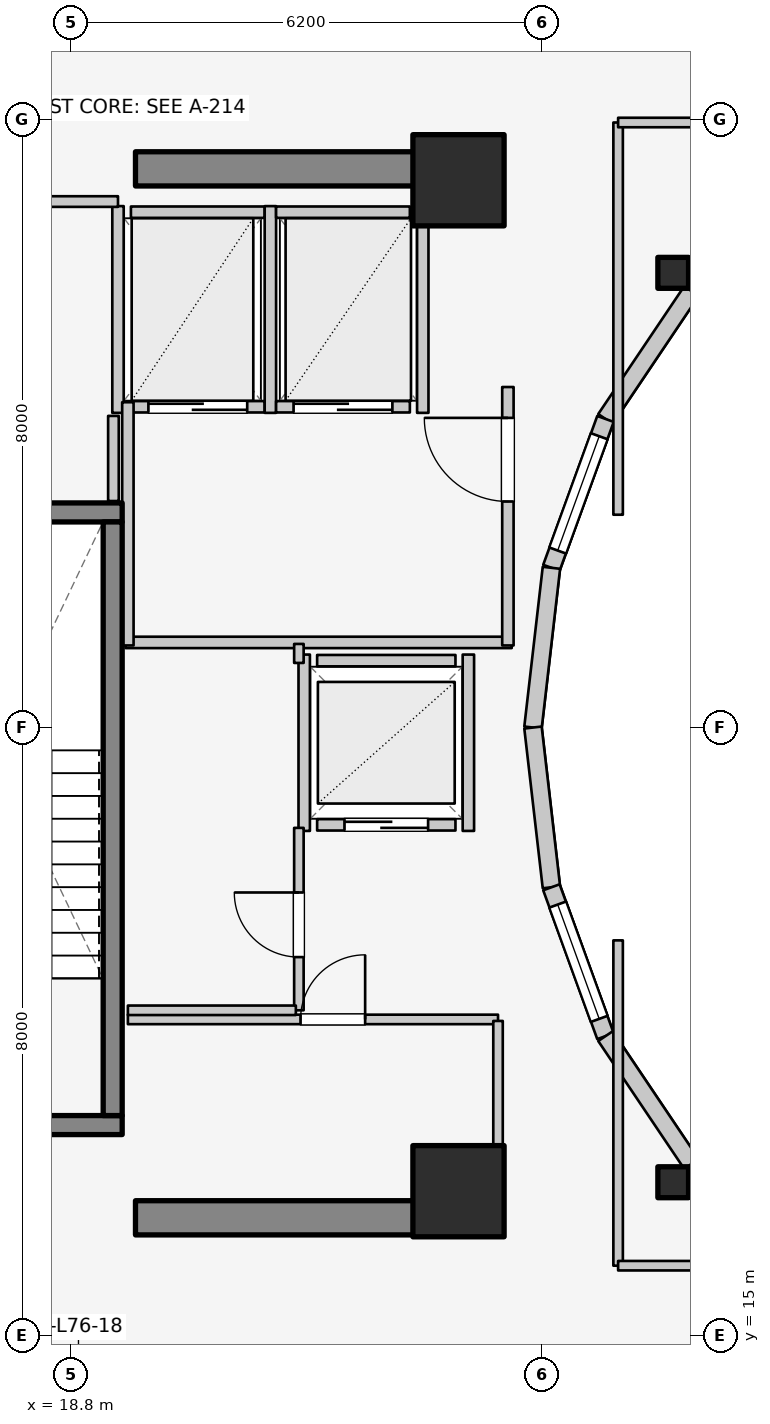
"""IFC4 building model, lengths in metres.
Left out: names, types, materials, properties, quantities, classifications, styles, units other than length and angle.
Written with IfcOpenShell. Run it as: python <this file> out.ifc"""

import sys

from ifc_helpers import new_model, si_unit, direction, frame, frame_2d, origin, origin_2d, place, context, subcontext, project, spatial, rectangle, i_section, extrude, element, fill, save


model = new_model("IFC4")
c1 = context("Model", 3, precision=1e-05, world=origin(), true_north=direction((0.0, 1.0)))
c2 = subcontext(c1, "Body", "Model", "MODEL_VIEW")
j1 = project(units=[si_unit("LENGTHUNIT", "METRE"), si_unit("PLANEANGLEUNIT", "RADIAN")], contexts=[c1])
p1 = place(None, origin())
s1 = spatial("IfcSite", under=j1, at=p1, CompositionType="ELEMENT")
p2 = place(p1, origin())
s2 = spatial("IfcBuilding", under=s1, at=p2, CompositionType="ELEMENT")
p3 = place(p2, frame((0.0, 0.0, 249.6)))
s3 = spatial("IfcBuildingStorey", under=s2, at=p3, CompositionType="ELEMENT", Elevation=249.6)
for number, where, z_axis, x_axis in (
    (1, (19.65, 16.55, 0.0), (0.0, 0.0, 1.0), (1.0, 0.0, 0.0)),
    (2, (19.65, 30.35, 0.0), (0.0, 0.0, 1.0), (1.0, 0.0, 0.0)),
):
    element("IfcWall", number, at=place(p3, frame(where, z_axis=z_axis, x_axis=x_axis)), inside=s3, PredefinedType="SHEAR", context=c2, shape_type="SweptSolid", body=[
        extrude(rectangle(XDim=4.5, YDim=0.45, at=frame_2d((2.25, 0.0))), origin(), (0.0, 0.0, 1.0), 3.6),
    ])
p4 = place(p3, frame((16.105, 17.77, 0.0), z_axis=(0.0, 0.0, 1.0), x_axis=(1.0, 0.0, 0.0)))
e3 = element("IfcWall", 3, at=p4, inside=s3, PredefinedType="SOLIDWALL", context=c2, shape_type="SweptSolid", body=[
    extrude(rectangle(XDim=3.37, YDim=0.25, at=frame_2d((1.685, 0.0))), origin(), (0.0, 0.0, 1.0), 3.6),
])
p5 = place(p4, frame((1.135, 0.0, 0.0)))
e4 = element("IfcOpeningElement", 4, at=p5, cuts=e3, PredefinedType="OPENING", context=c2, shape_type="SweptSolid", body=[
    extrude(rectangle(XDim=1.1, YDim=2.1, at=frame_2d((0.55, 1.05))), frame((0.0, 0.135, 0.0), z_axis=(0.0, -1.0, 0.0), x_axis=(1.0, 0.0, 0.0)), (0.0, 0.0, 1.0), 0.27),
])
p6 = place(p3, frame((16.105, 25.83, 0.0), z_axis=(0.0, 0.0, 1.0), x_axis=(1.0, 0.0, 0.0)))
e5 = element("IfcWall", 5, at=p6, inside=s3, PredefinedType="SOLIDWALL", context=c2, shape_type="SweptSolid", body=[
    extrude(rectangle(XDim=3.37, YDim=0.25, at=frame_2d((1.685, 0.0))), origin(), (0.0, 0.0, 1.0), 3.6),
])
p7 = place(p3, frame((19.35, 17.895, 0.0), z_axis=(0.0, 0.0, 1.0), x_axis=(0.0, 1.0, 0.0)))
e6 = element("IfcWall", 6, at=p7, inside=s3, PredefinedType="SOLIDWALL", context=c2, shape_type="SweptSolid", body=[
    extrude(rectangle(XDim=7.81, YDim=0.25, at=frame_2d((3.905, 0.0))), origin(), (0.0, 0.0, 1.0), 3.6),
])
for number, where, z_axis, x_axis in (
    (7, (23.9, 16.9, 0.0), (0.0, 0.0, 1.0), (1.0, 0.0, 0.0)),
    (8, (23.9, 30.2, 0.0), (0.0, 0.0, 1.0), (1.0, 0.0, 0.0)),
):
    element("IfcColumn", number, at=place(p3, frame(where, z_axis=z_axis, x_axis=x_axis)), inside=s3, PredefinedType="COLUMN", context=c2, shape_type="SweptSolid", body=[
        extrude(rectangle(XDim=1.2, YDim=1.2, at=origin_2d()), origin(), (0.0, 0.0, 1.0), 3.6),
    ])
for number, where, z_axis, x_axis in (
    (9, (26.725, 28.982, 0.0), (0.0, 0.0, 1.0), (1.0, 0.0, 0.0)),
    (10, (26.725, 17.018, 0.0), (0.0, 0.0, 1.0), (1.0, 0.0, 0.0)),
):
    element("IfcColumn", number, at=place(p3, frame(where, z_axis=z_axis, x_axis=x_axis)), inside=s3, PredefinedType="COLUMN", context=c2, shape_type="SweptSolid", body=[
        extrude(i_section(OverallWidth=0.404, OverallDepth=0.407, WebThickness=0.027, FlangeThickness=0.044, FilletRadius=0.025, at=origin_2d()), origin(), (0.0, 0.0, 1.0), 3.6),
    ])
p8 = place(p3, frame((28.44, 30.032, 0.0), z_axis=(0.0, 0.0, 1.0), x_axis=(-0.752576694707, -0.658504607869, 0.0)))
e11 = element("IfcWall", 11, at=p8, inside=s3, PredefinedType="STANDARD", context=c2, shape_type="SweptSolid", body=[
    extrude(rectangle(XDim=1.959, YDim=0.23, at=frame_2d((0.98, 0.0))), origin(), (0.0, 0.0, 1.0), 2.6),
])
p9 = place(p3, frame((26.965, 28.742, 0.0), z_axis=(0.0, 0.0, 1.0), x_axis=(-0.558197800898, -0.829707909492, 0.0)))
e12 = element("IfcWall", 12, at=p9, inside=s3, PredefinedType="STANDARD", context=c2, shape_type="SweptSolid", body=[
    extrude(rectangle(XDim=2.027, YDim=0.23, at=frame_2d((1.013, 0.0))), origin(), (0.0, 0.0, 1.0), 2.6),
])
p10 = place(p3, frame((25.834, 27.06, 0.0), z_axis=(0.0, 0.0, 1.0), x_axis=(-0.341423187295, -0.93990968033, 0.0)))
e13 = element("IfcWall", 13, at=p10, inside=s3, PredefinedType="STANDARD", context=c2, shape_type="SweptSolid", body=[
    extrude(rectangle(XDim=2.084, YDim=0.23, at=frame_2d((1.042, 0.0))), origin(), (0.0, 0.0, 1.0), 3.28),
])
p11 = place(p10, frame((0.242, 0.0, 0.85)))
e14 = element("IfcOpeningElement", 14, at=p11, cuts=e13, PredefinedType="OPENING", context=c2, shape_type="SweptSolid", body=[
    extrude(rectangle(XDim=1.6, YDim=1.65, at=frame_2d((0.8, 0.825))), frame((0.0, 0.125, 0.0), z_axis=(0.0, -1.0, 0.0), x_axis=(1.0, 0.0, 0.0)), (0.0, 0.0, 1.0), 0.25),
])
for number, where, z_axis, x_axis in (
    (15, (25.123, 25.102, 0.0), (0.0, 0.0, 1.0), (-0.115, -0.993, 0.0)),
    (16, (24.88, 23.0, 0.0), (0.0, 0.0, 1.0), (0.115, -0.993, 0.0)),
):
    element("IfcWall", number, at=place(p3, frame(where, z_axis=z_axis, x_axis=x_axis)), inside=s3, PredefinedType="STANDARD", context=c2, shape_type="SweptSolid", body=[
        extrude(rectangle(XDim=2.115, YDim=0.23, at=frame_2d((1.058, 0.0))), origin(), (0.0, 0.0, 1.0), 3.28),
    ])
p12 = place(p3, frame((25.123, 20.898, 0.0), z_axis=(0.0, 0.0, 1.0), x_axis=(0.341423187295, -0.93990968033, 0.0)))
e17 = element("IfcWall", 17, at=p12, inside=s3, PredefinedType="STANDARD", context=c2, shape_type="SweptSolid", body=[
    extrude(rectangle(XDim=2.084, YDim=0.23, at=frame_2d((1.042, 0.0))), origin(), (0.0, 0.0, 1.0), 3.28),
])
p13 = place(p12, frame((0.242, 0.0, 0.85)))
e18 = element("IfcOpeningElement", 18, at=p13, cuts=e17, PredefinedType="OPENING", context=c2, shape_type="SweptSolid", body=[
    extrude(rectangle(XDim=1.6, YDim=1.65, at=frame_2d((0.8, 0.825))), frame((0.0, 0.125, 0.0), z_axis=(0.0, -1.0, 0.0), x_axis=(1.0, 0.0, 0.0)), (0.0, 0.0, 1.0), 0.25),
])
p14 = place(p3, frame((25.834, 18.94, 0.0), z_axis=(0.0, 0.0, 1.0), x_axis=(0.558197800898, -0.829707909492, 0.0)))
e19 = element("IfcWall", 19, at=p14, inside=s3, PredefinedType="STANDARD", context=c2, shape_type="SweptSolid", body=[
    extrude(rectangle(XDim=2.027, YDim=0.23, at=frame_2d((1.013, 0.0))), origin(), (0.0, 0.0, 1.0), 2.6),
])
p15 = place(p3, frame((26.965, 17.258, 0.0), z_axis=(0.0, 0.0, 1.0), x_axis=(0.752576694707, -0.658504607869, 0.0)))
e20 = element("IfcWall", 20, at=p15, inside=s3, PredefinedType="STANDARD", context=c2, shape_type="SweptSolid", body=[
    extrude(rectangle(XDim=1.959, YDim=0.23, at=frame_2d((0.98, 0.0))), origin(), (0.0, 0.0, 1.0), 2.6),
])
p16 = place(p3, frame((22.04, 21.72, 0.0), z_axis=(0.0, 0.0, 1.0), x_axis=(1.0, 0.0, 0.0)))
e21 = element("IfcWall", 21, at=p16, inside=s3, PredefinedType="SOLIDWALL", context=c2, shape_type="SweptSolid", body=[
    extrude(rectangle(XDim=1.82, YDim=0.15, at=frame_2d((0.91, 0.0))), origin(), (0.0, 0.0, 1.0), 2.62),
])
p17 = place(p16, frame((0.36, 0.0, 0.0)))
e22 = element("IfcOpeningElement", 22, at=p17, cuts=e21, PredefinedType="OPENING", context=c2, shape_type="SweptSolid", body=[
    extrude(rectangle(XDim=1.1, YDim=2.1, at=frame_2d((0.55, 1.05))), frame((0.0, 0.085, 0.0), z_axis=(0.0, -1.0, 0.0), x_axis=(1.0, 0.0, 0.0)), (0.0, 0.0, 1.0), 0.17),
])
p18 = place(p3, frame((22.04, 23.88, 0.0), z_axis=(0.0, 0.0, 1.0), x_axis=(1.0, 0.0, 0.0)))
e23 = element("IfcWall", 23, at=p18, inside=s3, PredefinedType="SOLIDWALL", context=c2, shape_type="SweptSolid", body=[
    extrude(rectangle(XDim=1.82, YDim=0.15, at=frame_2d((0.91, 0.0))), origin(), (0.0, 0.0, 1.0), 2.62),
])
p19 = place(p3, frame((21.87, 21.64, 0.0), z_axis=(0.0, 0.0, 1.0), x_axis=(0.0, 1.0, 0.0)))
e24 = element("IfcWall", 24, at=p19, inside=s3, PredefinedType="SOLIDWALL", context=c2, shape_type="SweptSolid", body=[
    extrude(rectangle(XDim=2.32, YDim=0.15, at=frame_2d((1.16, 0.0))), origin(), (0.0, 0.0, 1.0), 3.295),
])
p20 = place(p3, frame((24.03, 21.64, 0.0), z_axis=(0.0, 0.0, 1.0), x_axis=(0.0, 1.0, 0.0)))
e25 = element("IfcWall", 25, at=p20, inside=s3, PredefinedType="SOLIDWALL", context=c2, shape_type="SweptSolid", body=[
    extrude(rectangle(XDim=2.32, YDim=0.15, at=frame_2d((1.16, 0.0))), origin(), (0.0, 0.0, 1.0), 2.62),
])
p21 = place(p3, frame((19.59, 27.22, 0.0), z_axis=(0.0, 0.0, 1.0), x_axis=(1.0, 0.0, 0.0)))
e26 = element("IfcWall", 26, at=p21, inside=s3, PredefinedType="SOLIDWALL", context=c2, shape_type="SweptSolid", body=[
    extrude(rectangle(XDim=1.76, YDim=0.15, at=frame_2d((0.88, 0.0))), origin(), (0.0, 0.0, 1.0), 3.295),
])
p22 = place(p21, frame((0.23, 0.0, 0.0)))
e27 = element("IfcOpeningElement", 27, at=p22, cuts=e26, PredefinedType="OPENING", context=c2, shape_type="SweptSolid", body=[
    extrude(rectangle(XDim=1.3, YDim=2.1, at=frame_2d((0.65, 1.05))), frame((0.0, 0.085, 0.0), z_axis=(0.0, -1.0, 0.0), x_axis=(1.0, 0.0, 0.0)), (0.0, 0.0, 1.0), 0.17),
])
p23 = place(p3, frame((19.59, 29.78, 0.0), z_axis=(0.0, 0.0, 1.0), x_axis=(1.0, 0.0, 0.0)))
e28 = element("IfcWall", 28, at=p23, inside=s3, PredefinedType="SOLIDWALL", context=c2, shape_type="SweptSolid", body=[
    extrude(rectangle(XDim=1.76, YDim=0.15, at=frame_2d((0.88, 0.0))), origin(), (0.0, 0.0, 1.0), 3.295),
])
for number, where, z_axis, x_axis in (
    (29, (19.42, 27.14, 0.0), (0.0, 0.0, 1.0), (0.0, 1.0, 0.0)),
    (30, (21.425, 27.14, 0.0), (0.0, 0.0, 1.0), (0.0, 1.0, 0.0)),
):
    element("IfcWall", number, at=place(p3, frame(where, z_axis=z_axis, x_axis=x_axis)), inside=s3, PredefinedType="SOLIDWALL", context=c2, shape_type="SweptSolid", body=[
        extrude(rectangle(XDim=2.72, YDim=0.15, at=frame_2d((1.36, 0.0))), origin(), (0.0, 0.0, 1.0), 3.295),
    ])
p24 = place(p3, frame((21.5, 27.22, 0.0), z_axis=(0.0, 0.0, 1.0), x_axis=(1.0, 0.0, 0.0)))
e31 = element("IfcWall", 31, at=p24, inside=s3, PredefinedType="SOLIDWALL", context=c2, shape_type="SweptSolid", body=[
    extrude(rectangle(XDim=1.76, YDim=0.15, at=frame_2d((0.88, 0.0))), origin(), (0.0, 0.0, 1.0), 3.295),
])
p25 = place(p24, frame((0.23, 0.0, 0.0)))
e32 = element("IfcOpeningElement", 32, at=p25, cuts=e31, PredefinedType="OPENING", context=c2, shape_type="SweptSolid", body=[
    extrude(rectangle(XDim=1.3, YDim=2.1, at=frame_2d((0.65, 1.05))), frame((0.0, 0.085, 0.0), z_axis=(0.0, -1.0, 0.0), x_axis=(1.0, 0.0, 0.0)), (0.0, 0.0, 1.0), 0.17),
])
p26 = place(p3, frame((21.5, 29.78, 0.0), z_axis=(0.0, 0.0, 1.0), x_axis=(1.0, 0.0, 0.0)))
e33 = element("IfcWall", 33, at=p26, inside=s3, PredefinedType="SOLIDWALL", context=c2, shape_type="SweptSolid", body=[
    extrude(rectangle(XDim=1.76, YDim=0.15, at=frame_2d((0.88, 0.0))), origin(), (0.0, 0.0, 1.0), 3.295),
])
p27 = place(p3, frame((23.43, 27.14, 0.0), z_axis=(0.0, 0.0, 1.0), x_axis=(0.0, 1.0, 0.0)))
e34 = element("IfcWall", 34, at=p27, inside=s3, PredefinedType="SOLIDWALL", context=c2, shape_type="SweptSolid", body=[
    extrude(rectangle(XDim=2.72, YDim=0.15, at=frame_2d((1.36, 0.0))), origin(), (0.0, 0.0, 1.0), 3.295),
])
p28 = place(p3, frame((19.52, 24.12, 0.0), z_axis=(0.0, 0.0, 1.0), x_axis=(1.0, 0.0, 0.0)))
e35 = element("IfcWall", 35, at=p28, inside=s3, PredefinedType="PARTITIONING", context=c2, shape_type="SweptSolid", body=[
    extrude(rectangle(XDim=5.08, YDim=0.15, at=frame_2d((2.54, 0.0))), origin(), (0.0, 0.0, 1.0), 2.62),
])
p29 = place(p3, frame((19.55, 24.08, 0.0), z_axis=(0.0, 0.0, 1.0), x_axis=(0.0, 1.0, 0.0)))
e36 = element("IfcWall", 36, at=p29, inside=s3, PredefinedType="PARTITIONING", context=c2, shape_type="SweptSolid", body=[
    extrude(rectangle(XDim=3.2, YDim=0.15, at=frame_2d((1.6, 0.0))), origin(), (0.0, 0.0, 1.0), 3.295),
])
p30 = place(p3, frame((24.55, 24.08, 0.0), z_axis=(0.0, 0.0, 1.0), x_axis=(0.0, 1.0, 0.0)))
e37 = element("IfcWall", 37, at=p30, inside=s3, PredefinedType="PARTITIONING", context=c2, shape_type="SweptSolid", body=[
    extrude(rectangle(XDim=3.4, YDim=0.15, at=frame_2d((1.7, 0.0))), origin(), (0.0, 0.0, 1.0), 3.295),
])
p31 = place(p30, frame((1.894, 0.0, 0.0)))
e38 = element("IfcOpeningElement", 38, at=p31, cuts=e37, PredefinedType="OPENING", context=c2, shape_type="SweptSolid", body=[
    extrude(rectangle(XDim=1.1, YDim=2.1, at=frame_2d((0.55, 1.05))), frame((0.0, 0.085, 0.0), z_axis=(0.0, -1.0, 0.0), x_axis=(1.0, 0.0, 0.0)), (0.0, 0.0, 1.0), 0.17),
])
p32 = place(p3, frame((19.55, 19.16, 0.0), z_axis=(0.0, 0.0, 1.0), x_axis=(1.0, 0.0, 0.0)))
e39 = element("IfcWall", 39, at=p32, inside=s3, PredefinedType="PARTITIONING", context=c2, shape_type="SweptSolid", body=[
    extrude(rectangle(XDim=4.87, YDim=0.125, at=frame_2d((2.435, 0.0))), origin(), (0.0, 0.0, 1.0), 2.62),
])
p33 = place(p32, frame((2.272, 0.0, 0.0)))
e40 = element("IfcOpeningElement", 40, at=p33, cuts=e39, PredefinedType="OPENING", context=c2, shape_type="SweptSolid", body=[
    extrude(rectangle(XDim=0.85, YDim=2.05, at=frame_2d((0.425, 1.025))), frame((0.0, 0.073, 0.0), z_axis=(0.0, -1.0, 0.0), x_axis=(1.0, 0.0, 0.0)), (0.0, 0.0, 1.0), 0.145),
])
p34 = place(p3, frame((24.42, 17.1, 0.0), z_axis=(0.0, 0.0, 1.0), x_axis=(0.0, 1.0, 0.0)))
e41 = element("IfcWall", 41, at=p34, inside=s3, PredefinedType="PARTITIONING", context=c2, shape_type="SweptSolid", body=[
    extrude(rectangle(XDim=2.04, YDim=0.125, at=frame_2d((1.02, 0.0))), origin(), (0.0, 0.0, 1.0), 2.672),
])
p35 = place(p3, frame((21.8, 19.28, 0.0), z_axis=(0.0, 0.0, 1.0), x_axis=(0.0, 1.0, 0.0)))
e42 = element("IfcWall", 42, at=p35, inside=s3, PredefinedType="PARTITIONING", context=c2, shape_type="SweptSolid", body=[
    extrude(rectangle(XDim=2.4, YDim=0.125, at=frame_2d((1.2, 0.0))), origin(), (0.0, 0.0, 1.0), 3.295),
])
p36 = place(p35, frame((0.7, 0.0, 0.0)))
e43 = element("IfcOpeningElement", 43, at=p36, cuts=e42, PredefinedType="OPENING", context=c2, shape_type="SweptSolid", body=[
    extrude(rectangle(XDim=0.85, YDim=2.05, at=frame_2d((0.425, 1.025))), frame((0.0, 0.073, 0.0), z_axis=(0.0, -1.0, 0.0), x_axis=(1.0, 0.0, 0.0)), (0.0, 0.0, 1.0), 0.145),
])
p37 = place(p3, frame((21.8, 23.85, 0.0), z_axis=(0.0, 0.0, 1.0), x_axis=(0.0, 1.0, 0.0)))
e44 = element("IfcWall", 44, at=p37, inside=s3, PredefinedType="PARTITIONING", context=c2, shape_type="SweptSolid", body=[
    extrude(rectangle(XDim=0.25, YDim=0.125, at=frame_2d((0.125, 0.0))), origin(), (0.0, 0.0, 1.0), 3.295),
])
p38 = place(p3, frame((19.55, 19.28, 0.0), z_axis=(0.0, 0.0, 1.0), x_axis=(1.0, 0.0, 0.0)))
e45 = element("IfcWall", 45, at=p38, inside=s3, PredefinedType="PARTITIONING", context=c2, shape_type="SweptSolid", body=[
    extrude(rectangle(XDim=2.21, YDim=0.125, at=frame_2d((1.105, 0.0))), origin(), (0.0, 0.0, 1.0), 2.62),
])
p39 = place(p3, frame((16.12, 29.92, 0.0), z_axis=(0.0, 0.0, 1.0), x_axis=(1.0, 0.0, 0.0)))
e46 = element("IfcWall", 46, at=p39, inside=s3, PredefinedType="PLUMBINGWALL", context=c2, shape_type="SweptSolid", body=[
    extrude(rectangle(XDim=3.3, YDim=0.14, at=frame_2d((1.65, 0.0))), origin(), (0.0, 0.0, 1.0), 3.295),
])
p40 = place(p39, frame((1.399, 0.0, 0.0)))
e47 = element("IfcOpeningElement", 47, at=p40, cuts=e46, PredefinedType="OPENING", context=c2, shape_type="SweptSolid", body=[
    extrude(rectangle(XDim=0.85, YDim=2.05, at=frame_2d((0.425, 1.025))), frame((0.0, 0.08, 0.0), z_axis=(0.0, -1.0, 0.0), x_axis=(1.0, 0.0, 0.0)), (0.0, 0.0, 1.0), 0.16),
])
p41 = place(p3, frame((19.36, 25.98, 0.0), z_axis=(0.0, 0.0, 1.0), x_axis=(0.0, 1.0, 0.0)))
e48 = element("IfcWall", 48, at=p41, inside=s3, PredefinedType="PLUMBINGWALL", context=c2, shape_type="SweptSolid", body=[
    extrude(rectangle(XDim=1.12, YDim=0.14, at=frame_2d((0.56, 0.0))), origin(), (0.0, 0.0, 1.0), 3.295),
])
p42 = place(p3, frame((28.45, 30.015, 0.0), z_axis=(0.0, 0.0, 1.0), x_axis=(-0.522763432117, 0.852477796802, 0.0)))
e49 = element("IfcWall", 49, at=p42, inside=s3, PredefinedType="PARTITIONING", context=c2, shape_type="SweptSolid", body=[
    extrude(rectangle(XDim=3.269, YDim=0.125, at=frame_2d((1.635, 0.0))), origin(), (0.0, 0.0, 1.0), 2.672),
])
p43 = place(p3, frame((28.45, 15.985, 0.0), z_axis=(0.0, 0.0, 1.0), x_axis=(-0.52592395012, -0.850531597702, 0.0)))
e50 = element("IfcWall", 50, at=p43, inside=s3, PredefinedType="PARTITIONING", context=c2, shape_type="SweptSolid", body=[
    extrude(rectangle(XDim=2.869, YDim=0.125, at=frame_2d((1.435, 0.0))), origin(), (0.0, 0.0, 1.0), 2.672),
])
p44 = place(p3, frame((26.0, 25.8, 0.0), z_axis=(0.0, 0.0, 1.0), x_axis=(0.0, 1.0, 0.0)))
e51 = element("IfcWall", 51, at=p44, inside=s3, PredefinedType="PARTITIONING", context=c2, shape_type="SweptSolid", body=[
    extrude(rectangle(XDim=5.16, YDim=0.125, at=frame_2d((2.58, 0.0))), origin(), (0.0, 0.0, 1.0), 2.672),
])
p45 = place(p3, frame((26.0, 30.96, 0.0), z_axis=(0.0, 0.0, 1.0), x_axis=(1.0, 0.0, 0.0)))
e52 = element("IfcWall", 52, at=p45, inside=s3, PredefinedType="PARTITIONING", context=c2, shape_type="SweptSolid", body=[
    extrude(rectangle(XDim=2.6, YDim=0.125, at=frame_2d((1.3, 0.0))), origin(), (0.0, 0.0, 1.0), 2.816),
])
p46 = place(p3, frame((26.0, 15.92, 0.0), z_axis=(0.0, 0.0, 1.0), x_axis=(0.0, 1.0, 0.0)))
e53 = element("IfcWall", 53, at=p46, inside=s3, PredefinedType="PARTITIONING", context=c2, shape_type="SweptSolid", body=[
    extrude(rectangle(XDim=4.28, YDim=0.125, at=frame_2d((2.14, 0.0))), origin(), (0.0, 0.0, 1.0), 2.672),
])
p47 = place(p3, frame((26.0, 15.92, 0.0), z_axis=(0.0, 0.0, 1.0), x_axis=(1.0, 0.0, 0.0)))
e54 = element("IfcWall", 54, at=p47, inside=s3, PredefinedType="PARTITIONING", context=c2, shape_type="SweptSolid", body=[
    extrude(rectangle(XDim=2.6, YDim=0.125, at=frame_2d((1.3, 0.0))), origin(), (0.0, 0.0, 1.0), 2.672),
])
p48 = place(p11, origin())
e55 = element("IfcWindow", 55, at=p48, inside=s3, PartitioningType="SINGLE_PANEL", PredefinedType="WINDOW", context=c2, shape_type="SweptSolid", body=[
    extrude(rectangle(XDim=1.6, YDim=1.65, at=frame_2d((0.8, 0.825))), frame((0.0, 0.03, 0.0), z_axis=(0.0, -1.0, 0.0), x_axis=(1.0, 0.0, 0.0)), (0.0, 0.0, 1.0), 0.06),
])
fill(e14, e55)
p49 = place(p13, origin())
e56 = element("IfcWindow", 56, at=p49, inside=s3, PartitioningType="SINGLE_PANEL", PredefinedType="WINDOW", context=c2, shape_type="SweptSolid", body=[
    extrude(rectangle(XDim=1.6, YDim=1.65, at=frame_2d((0.8, 0.825))), frame((0.0, 0.03, 0.0), z_axis=(0.0, -1.0, 0.0), x_axis=(1.0, 0.0, 0.0)), (0.0, 0.0, 1.0), 0.06),
])
fill(e18, e56)
p50 = place(p17, origin())
e57 = element("IfcDoor", 57, at=p50, inside=s3, OperationType="DOUBLE_DOOR_SLIDING", PredefinedType="DOOR", context=c2, shape_type="SweptSolid", body=[
    extrude(rectangle(XDim=1.1, YDim=2.1, at=frame_2d((0.55, 1.05))), frame((0.0, 0.025, 0.0), z_axis=(0.0, -1.0, 0.0), x_axis=(1.0, 0.0, 0.0)), (0.0, 0.0, 1.0), 0.05),
])
fill(e22, e57)
p51 = place(p22, origin())
e58 = element("IfcDoor", 58, at=p51, inside=s3, OperationType="DOUBLE_DOOR_SLIDING", PredefinedType="DOOR", context=c2, shape_type="SweptSolid", body=[
    extrude(rectangle(XDim=1.3, YDim=2.1, at=frame_2d((0.65, 1.05))), frame((0.0, 0.025, 0.0), z_axis=(0.0, -1.0, 0.0), x_axis=(1.0, 0.0, 0.0)), (0.0, 0.0, 1.0), 0.05),
])
fill(e27, e58)
p52 = place(p25, origin())
e59 = element("IfcDoor", 59, at=p52, inside=s3, OperationType="DOUBLE_DOOR_SLIDING", PredefinedType="DOOR", context=c2, shape_type="SweptSolid", body=[
    extrude(rectangle(XDim=1.3, YDim=2.1, at=frame_2d((0.65, 1.05))), frame((0.0, 0.025, 0.0), z_axis=(0.0, -1.0, 0.0), x_axis=(1.0, 0.0, 0.0)), (0.0, 0.0, 1.0), 0.05),
])
fill(e32, e59)
p53 = place(p31, origin())
e60 = element("IfcDoor", 60, at=p53, inside=s3, OperationType="SINGLE_SWING_RIGHT", PredefinedType="DOOR", context=c2, shape_type="SweptSolid", body=[
    extrude(rectangle(XDim=1.1, YDim=2.1, at=frame_2d((0.55, 1.05))), frame((0.0, 0.025, 0.0), z_axis=(0.0, -1.0, 0.0), x_axis=(1.0, 0.0, 0.0)), (0.0, 0.0, 1.0), 0.05),
])
fill(e38, e60)
p54 = place(p33, origin())
e61 = element("IfcDoor", 61, at=p54, inside=s3, OperationType="SINGLE_SWING_RIGHT", PredefinedType="DOOR", context=c2, shape_type="SweptSolid", body=[
    extrude(rectangle(XDim=0.85, YDim=2.05, at=frame_2d((0.425, 1.025))), frame((0.0, 0.025, 0.0), z_axis=(0.0, -1.0, 0.0), x_axis=(1.0, 0.0, 0.0)), (0.0, 0.0, 1.0), 0.05),
])
fill(e40, e61)
p55 = place(p36, origin())
e62 = element("IfcDoor", 62, at=p55, inside=s3, OperationType="SINGLE_SWING_RIGHT", PredefinedType="DOOR", context=c2, shape_type="SweptSolid", body=[
    extrude(rectangle(XDim=0.85, YDim=2.05, at=frame_2d((0.425, 1.025))), frame((0.0, 0.025, 0.0), z_axis=(0.0, -1.0, 0.0), x_axis=(1.0, 0.0, 0.0)), (0.0, 0.0, 1.0), 0.05),
])
fill(e43, e62)
save(model, sys.argv[1])
